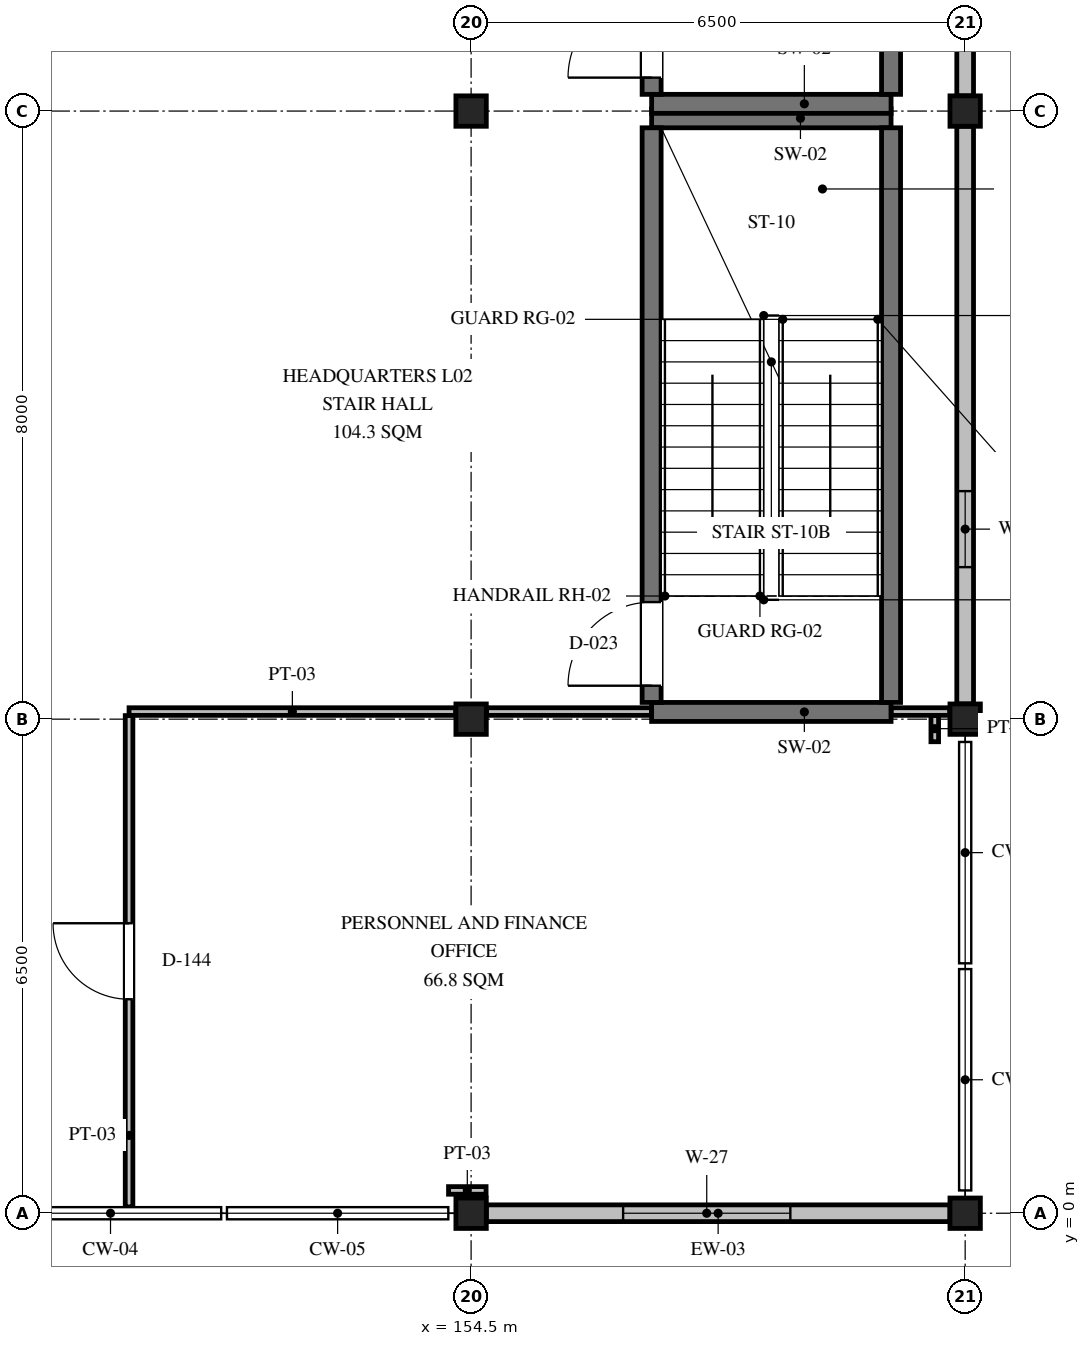
"""IFC4 building model, lengths in metres.
Left out: names, types, materials, properties, quantities, classifications, styles, units other than length and angle.
Written with IfcOpenShell. Run it as: python <this file> out.ifc"""

import sys

from ifc_helpers import new_model, si_unit, direction, frame, frame_2d, origin, origin_2d, place, context, subcontext, project, spatial, rectangle, i_section, extrude, element, fill, save


model = new_model("IFC4")
c1 = context("Model", 3, precision=1e-05, world=origin(), true_north=direction((0.0, 1.0)))
c2 = subcontext(c1, "Body", "Model", "MODEL_VIEW")
j1 = project(units=[si_unit("LENGTHUNIT", "METRE"), si_unit("PLANEANGLEUNIT", "RADIAN")], contexts=[c1])
p1 = place(None, origin())
s1 = spatial("IfcSite", under=j1, at=p1, CompositionType="ELEMENT")
p2 = place(p1, origin())
s2 = spatial("IfcBuilding", under=s1, at=p2, CompositionType="ELEMENT")
p3 = place(p2, frame((0.0, 0.0, 5.85)))
s3 = spatial("IfcBuildingStorey", under=s2, at=p3, CompositionType="ELEMENT", Elevation=5.85)
for number, where, z_axis, x_axis in (
    (1, (154.5, 0.0, 0.0), (0.0, 0.0, 1.0), (1.0, 0.0, 0.0)),
    (2, (154.5, 6.5, 0.0), (0.0, 0.0, 1.0), (1.0, 0.0, 0.0)),
    (3, (154.5, 14.5, 0.0), (0.0, 0.0, 1.0), (1.0, 0.0, 0.0)),
    (4, (161.0, 0.0, 0.0), (0.0, 0.0, 1.0), (1.0, 0.0, 0.0)),
    (5, (161.0, 6.5, 0.0), (0.0, 0.0, 1.0), (1.0, 0.0, 0.0)),
    (6, (161.0, 14.5, 0.0), (0.0, 0.0, 1.0), (1.0, 0.0, 0.0)),
):
    element("IfcColumn", number, at=place(p3, frame(where, z_axis=z_axis, x_axis=x_axis)), inside=s3, PredefinedType="COLUMN", context=c2, shape_type="SweptSolid", body=[
        extrude(i_section(OverallWidth=0.4, OverallDepth=0.4, WebThickness=0.013, FlangeThickness=0.021, FilletRadius=0.022, at=origin_2d()), origin(), (0.0, 0.0, 1.0), 4.2),
    ])
p4 = place(p3, frame((154.7, 0.0, 0.0), z_axis=(0.0, 0.0, 1.0), x_axis=(1.0, 0.0, 0.0)))
e7 = element("IfcWall", 7, at=p4, inside=s3, PredefinedType="SOLIDWALL", context=c2, shape_type="SweptSolid", body=[
    extrude(rectangle(XDim=6.1, YDim=0.22, at=frame_2d((3.05, 0.0))), origin(), (0.0, 0.0, 1.0), 3.564),
])
p5 = place(p4, frame((1.8, 0.0, 1.0)))
e8 = element("IfcOpeningElement", 8, at=p5, cuts=e7, PredefinedType="OPENING", context=c2, shape_type="SweptSolid", body=[
    extrude(rectangle(XDim=2.2, YDim=1.8, at=frame_2d((1.1, 0.9))), frame((0.0, 0.12, 0.0), z_axis=(0.0, -1.0, 0.0), x_axis=(1.0, 0.0, 0.0)), (0.0, 0.0, 1.0), 0.24),
])
p6 = place(p3, frame((161.0, 6.7, 0.0), z_axis=(0.0, 0.0, 1.0), x_axis=(0.0, 1.0, 0.0)))
e9 = element("IfcWall", 9, at=p6, inside=s3, PredefinedType="SOLIDWALL", context=c2, shape_type="SweptSolid", body=[
    extrude(rectangle(XDim=7.6, YDim=0.22, at=frame_2d((3.8, 0.0))), origin(), (0.0, 0.0, 1.0), 3.554),
])
p7 = place(p6, frame((1.8, 0.0, 1.05)))
e10 = element("IfcOpeningElement", 10, at=p7, cuts=e9, PredefinedType="OPENING", context=c2, shape_type="SweptSolid", body=[
    extrude(rectangle(XDim=1.0, YDim=2.0, at=frame_2d((0.5, 1.0))), frame((0.0, 0.12, 0.0), z_axis=(0.0, -1.0, 0.0), x_axis=(1.0, 0.0, 0.0)), (0.0, 0.0, 1.0), 0.24),
])
p8 = place(p3, frame((161.0, 14.7, 0.0), z_axis=(0.0, 0.0, 1.0), x_axis=(0.0, 1.0, 0.0)))
e11 = element("IfcWall", 11, at=p8, inside=s3, PredefinedType="SOLIDWALL", context=c2, shape_type="SweptSolid", body=[
    extrude(rectangle(XDim=7.6, YDim=0.22, at=frame_2d((3.8, 0.0))), origin(), (0.0, 0.0, 1.0), 3.366),
])
p9 = place(p8, frame((1.8, 0.0, 1.05)))
e12 = element("IfcOpeningElement", 12, at=p9, cuts=e11, PredefinedType="OPENING", context=c2, shape_type="SweptSolid", body=[
    extrude(rectangle(XDim=1.15, YDim=2.0, at=frame_2d((0.575, 1.0))), frame((0.0, 0.12, 0.0), z_axis=(0.0, -1.0, 0.0), x_axis=(1.0, 0.0, 0.0)), (0.0, 0.0, 1.0), 0.24),
])
for number, where, z_axis, x_axis in (
    (13, (156.875, 6.595, 0.0), (0.0, 0.0, 1.0), (1.0, 0.0, 0.0)),
    (14, (156.875, 14.405, 0.0), (0.0, 0.0, 1.0), (1.0, 0.0, 0.0)),
):
    element("IfcWall", number, at=place(p3, frame(where, z_axis=z_axis, x_axis=x_axis)), inside=s3, PredefinedType="SHEAR", context=c2, shape_type="SweptSolid", body=[
        extrude(rectangle(XDim=3.15, YDim=0.25, at=frame_2d((1.575, 0.0))), origin(), (0.0, 0.0, 1.0), 3.96),
    ])
p10 = place(p3, frame((156.875, 6.72, 0.0), z_axis=(0.0, 0.0, 1.0), x_axis=(0.0, 1.0, 0.0)))
e15 = element("IfcWall", 15, at=p10, inside=s3, PredefinedType="SHEAR", context=c2, shape_type="SweptSolid", body=[
    extrude(rectangle(XDim=7.56, YDim=0.25, at=frame_2d((3.78, 0.0))), origin(), (0.0, 0.0, 1.0), 3.96),
])
p11 = place(p10, frame((0.22, 0.0, 0.0)))
e16 = element("IfcOpeningElement", 16, at=p11, cuts=e15, PredefinedType="OPENING", context=c2, shape_type="SweptSolid", body=[
    extrude(rectangle(XDim=1.1, YDim=2.15, at=frame_2d((0.55, 1.075))), frame((0.0, 0.135, 0.0), z_axis=(0.0, -1.0, 0.0), x_axis=(1.0, 0.0, 0.0)), (0.0, 0.0, 1.0), 0.27),
])
p12 = place(p3, frame((160.025, 6.72, 0.0), z_axis=(0.0, 0.0, 1.0), x_axis=(0.0, 1.0, 0.0)))
e17 = element("IfcWall", 17, at=p12, inside=s3, PredefinedType="SHEAR", context=c2, shape_type="SweptSolid", body=[
    extrude(rectangle(XDim=7.56, YDim=0.25, at=frame_2d((3.78, 0.0))), origin(), (0.0, 0.0, 1.0), 3.96),
])
p13 = place(p3, frame((156.875, 14.595, 0.0), z_axis=(0.0, 0.0, 1.0), x_axis=(1.0, 0.0, 0.0)))
e18 = element("IfcWall", 18, at=p13, inside=s3, PredefinedType="SHEAR", context=c2, shape_type="SweptSolid", body=[
    extrude(rectangle(XDim=3.15, YDim=0.25, at=frame_2d((1.575, 0.0))), origin(), (0.0, 0.0, 1.0), 3.96),
])
p14 = place(p3, frame((156.875, 14.72, 0.0), z_axis=(0.0, 0.0, 1.0), x_axis=(0.0, 1.0, 0.0)))
e19 = element("IfcWall", 19, at=p14, inside=s3, PredefinedType="SHEAR", context=c2, shape_type="SweptSolid", body=[
    extrude(rectangle(XDim=7.56, YDim=0.25, at=frame_2d((3.78, 0.0))), origin(), (0.0, 0.0, 1.0), 3.96),
])
p15 = place(p14, frame((0.22, 0.0, 0.0)))
e20 = element("IfcOpeningElement", 20, at=p15, cuts=e19, PredefinedType="OPENING", context=c2, shape_type="SweptSolid", body=[
    extrude(rectangle(XDim=1.1, YDim=2.15, at=frame_2d((0.55, 1.075))), frame((0.0, 0.135, 0.0), z_axis=(0.0, -1.0, 0.0), x_axis=(1.0, 0.0, 0.0)), (0.0, 0.0, 1.0), 0.27),
])
p16 = place(p3, frame((160.025, 14.72, 0.0), z_axis=(0.0, 0.0, 1.0), x_axis=(0.0, 1.0, 0.0)))
e21 = element("IfcWall", 21, at=p16, inside=s3, PredefinedType="SHEAR", context=c2, shape_type="SweptSolid", body=[
    extrude(rectangle(XDim=7.56, YDim=0.25, at=frame_2d((3.78, 0.0))), origin(), (0.0, 0.0, 1.0), 3.96),
])
p17 = place(p3, frame((154.203, 0.3, 0.0), z_axis=(0.0, 0.0, 1.0), x_axis=(1.0, 0.0, 0.0)))
e22 = element("IfcWall", 22, at=p17, inside=s3, PredefinedType="PARTITIONING", context=c2, shape_type="SweptSolid", body=[
    extrude(rectangle(XDim=0.494, YDim=0.1, at=frame_2d((0.247, 0.0))), origin(), (0.0, 0.0, 1.0), 3.96),
])
p18 = place(p3, frame((150.0, 6.6, 0.0), z_axis=(0.0, 0.0, 1.0), x_axis=(1.0, 0.0, 0.0)))
e23 = element("IfcWall", 23, at=p18, inside=s3, PredefinedType="PARTITIONING", context=c2, shape_type="SweptSolid", body=[
    extrude(rectangle(XDim=4.297, YDim=0.1, at=frame_2d((2.148, 0.0))), origin(), (0.0, 0.0, 1.0), 3.254),
])
p19 = place(p3, frame((154.703, 6.6, 0.0), z_axis=(0.0, 0.0, 1.0), x_axis=(1.0, 0.0, 0.0)))
e24 = element("IfcWall", 24, at=p19, inside=s3, PredefinedType="PARTITIONING", context=c2, shape_type="SweptSolid", body=[
    extrude(rectangle(XDim=2.169, YDim=0.1, at=frame_2d((1.084, 0.0))), origin(), (0.0, 0.0, 1.0), 3.96),
])
p20 = place(p3, frame((160.028, 6.6, 0.0), z_axis=(0.0, 0.0, 1.0), x_axis=(1.0, 0.0, 0.0)))
e25 = element("IfcWall", 25, at=p20, inside=s3, PredefinedType="PARTITIONING", context=c2, shape_type="SweptSolid", body=[
    extrude(rectangle(XDim=0.769, YDim=0.1, at=frame_2d((0.385, 0.0))), origin(), (0.0, 0.0, 1.0), 3.96),
])
p21 = place(p3, frame((150.0, 0.083, 0.0), z_axis=(0.0, 0.0, 1.0), x_axis=(0.0, 1.0, 0.0)))
e26 = element("IfcWall", 26, at=p21, inside=s3, PredefinedType="PARTITIONING", context=c2, shape_type="SweptSolid", body=[
    extrude(rectangle(XDim=6.464, YDim=0.1, at=frame_2d((3.232, 0.0))), origin(), (0.0, 0.0, 1.0), 3.754),
])
p22 = place(p21, frame((2.732, 0.0, 0.0)))
e27 = element("IfcOpeningElement", 27, at=p22, cuts=e26, PredefinedType="OPENING", context=c2, shape_type="SweptSolid", body=[
    extrude(rectangle(XDim=1.0, YDim=2.1, at=frame_2d((0.5, 1.05))), frame((0.0, 0.06, 0.0), z_axis=(0.0, -1.0, 0.0), x_axis=(1.0, 0.0, 0.0)), (0.0, 0.0, 1.0), 0.12),
])
p23 = place(p3, frame((160.6, 6.203, 0.0), z_axis=(0.0, 0.0, 1.0), x_axis=(0.0, 1.0, 0.0)))
e28 = element("IfcWall", 28, at=p23, inside=s3, PredefinedType="PARTITIONING", context=c2, shape_type="SweptSolid", body=[
    extrude(rectangle(XDim=0.344, YDim=0.1, at=frame_2d((0.172, 0.0))), origin(), (0.0, 0.0, 1.0), 3.96),
])
p24 = place(p5, origin())
e29 = element("IfcWindow", 29, at=p24, inside=s3, PartitioningType="SINGLE_PANEL", PredefinedType="WINDOW", context=c2, shape_type="SweptSolid", body=[
    extrude(rectangle(XDim=2.2, YDim=1.8, at=frame_2d((1.1, 0.9))), frame((0.0, 0.03, 0.0), z_axis=(0.0, -1.0, 0.0), x_axis=(1.0, 0.0, 0.0)), (0.0, 0.0, 1.0), 0.06),
])
fill(e8, e29)
p25 = place(p7, origin())
e30 = element("IfcWindow", 30, at=p25, inside=s3, PartitioningType="SINGLE_PANEL", PredefinedType="WINDOW", context=c2, shape_type="SweptSolid", body=[
    extrude(rectangle(XDim=1.0, YDim=2.0, at=frame_2d((0.5, 1.0))), frame((0.0, 0.03, 0.0), z_axis=(0.0, -1.0, 0.0), x_axis=(1.0, 0.0, 0.0)), (0.0, 0.0, 1.0), 0.06),
])
fill(e10, e30)
p26 = place(p11, origin())
e31 = element("IfcDoor", 31, at=p26, inside=s3, OperationType="SINGLE_SWING_LEFT", PredefinedType="DOOR", context=c2, shape_type="SweptSolid", body=[
    extrude(rectangle(XDim=1.1, YDim=2.15, at=frame_2d((0.55, 1.075))), frame((0.0, 0.025, 0.0), z_axis=(0.0, -1.0, 0.0), x_axis=(1.0, 0.0, 0.0)), (0.0, 0.0, 1.0), 0.05),
])
fill(e16, e31)
p27 = place(p15, origin())
e32 = element("IfcDoor", 32, at=p27, inside=s3, OperationType="SINGLE_SWING_LEFT", PredefinedType="DOOR", context=c2, shape_type="SweptSolid", body=[
    extrude(rectangle(XDim=1.1, YDim=2.15, at=frame_2d((0.55, 1.075))), frame((0.0, 0.025, 0.0), z_axis=(0.0, -1.0, 0.0), x_axis=(1.0, 0.0, 0.0)), (0.0, 0.0, 1.0), 0.05),
])
fill(e20, e32)
p28 = place(p22, origin())
e33 = element("IfcDoor", 33, at=p28, inside=s3, OperationType="SINGLE_SWING_RIGHT", PredefinedType="DOOR", context=c2, shape_type="SweptSolid", body=[
    extrude(rectangle(XDim=1.0, YDim=2.1, at=frame_2d((0.5, 1.05))), frame((0.0, 0.025, 0.0), z_axis=(0.0, -1.0, 0.0), x_axis=(1.0, 0.0, 0.0)), (0.0, 0.0, 1.0), 0.05),
])
fill(e27, e33)
save(model, sys.argv[1])
